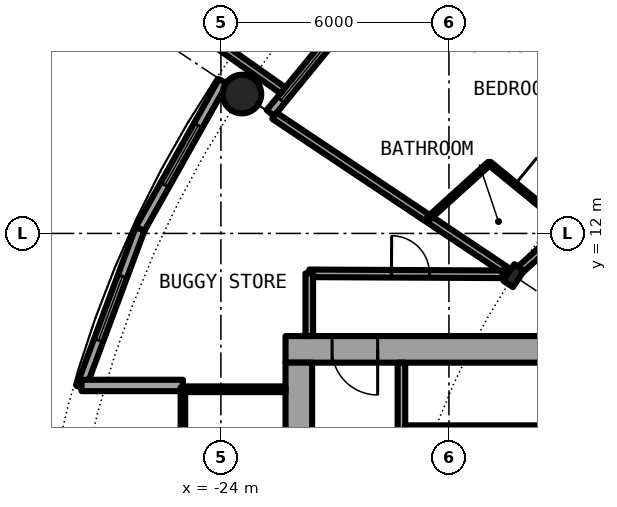
"""IFC4 building model, lengths in metres.
Left out: names, types, materials, properties, quantities, classifications, styles, units other than length and angle.
Written with IfcOpenShell. Run it as: python <this file> out.ifc"""

import sys

from ifc_helpers import new_model, si_unit, direction, frame, frame_2d, origin, origin_2d, place, context, subcontext, project, spatial, rectangle, hollow_circle, i_section, extrude, element, fill, save


model = new_model("IFC4")
c1 = context("Model", 3, precision=1e-05, world=origin(), true_north=direction((0.0, 1.0)))
c2 = subcontext(c1, "Body", "Model", "MODEL_VIEW")
j1 = project(units=[si_unit("LENGTHUNIT", "METRE"), si_unit("PLANEANGLEUNIT", "RADIAN")], contexts=[c1])
p1 = place(None, origin())
s1 = spatial("IfcSite", under=j1, at=p1, CompositionType="ELEMENT")
p2 = place(p1, origin())
s2 = spatial("IfcBuilding", under=s1, at=p2, CompositionType="ELEMENT")
p3 = place(p2, frame((0.0, 0.0, 81.9)))
s3 = spatial("IfcBuildingStorey", under=s2, at=p3, CompositionType="ELEMENT", Elevation=81.9)
p4 = place(p3, frame((-23.448, 15.667, 0.0), z_axis=(0.0, 0.0, 1.0), x_axis=(1.0, 0.0, 0.0)))
e1 = element("IfcColumn", 1, at=p4, inside=s3, PredefinedType="COLUMN", context=c2, shape_type="SweptSolid", body=[
    extrude(hollow_circle(Radius=0.508, WallThickness=0.04, at=origin_2d()), origin(), (0.0, 0.0, 1.0), 3.05),
])
p5 = place(p3, frame((-16.297, 10.889, 0.0), z_axis=(0.0, 0.0, 1.0), x_axis=(-0.831469612303, 0.55557023302, 0.0)))
e2 = element("IfcColumn", 2, at=p5, inside=s3, PredefinedType="COLUMN", context=c2, shape_type="SweptSolid", body=[
    extrude(i_section(OverallWidth=0.306, OverallDepth=0.524, WebThickness=0.021, FlangeThickness=0.04, FilletRadius=0.027, at=origin_2d()), origin(), (0.0, 0.0, 1.0), 3.05),
])
p6 = place(p3, frame((-19.304, 19.304, 0.0), z_axis=(0.0, 0.0, 1.0), x_axis=(-0.634382322723, -0.773019449054, 0.0)))
e3 = element("IfcWall", 3, at=p6, inside=s3, PredefinedType="SOLIDWALL", context=c2, shape_type="SweptSolid", body=[
    extrude(rectangle(XDim=5.352, YDim=0.25, at=frame_2d((2.676, 0.0))), origin(), (0.0, 0.0, 1.0), 2.7),
])
p7 = place(p6, frame((0.841, 0.0, 0.0)))
e4 = element("IfcOpeningElement", 4, at=p7, cuts=e3, PredefinedType="OPENING", context=c2, shape_type="SweptSolid", body=[
    extrude(rectangle(XDim=1.0, YDim=2.2, at=frame_2d((0.5, 1.1))), frame((0.0, 0.135, 0.0), z_axis=(0.0, -1.0, 0.0), x_axis=(1.0, 0.0, 0.0)), (0.0, 0.0, 1.0), 0.27),
])
p8 = place(p6, frame((3.111, 0.0, 0.3)))
e5 = element("IfcOpeningElement", 5, at=p8, cuts=e3, PredefinedType="OPENING", context=c2, shape_type="SweptSolid", body=[
    extrude(rectangle(XDim=1.8, YDim=2.1, at=frame_2d((0.9, 1.05))), frame((0.0, 0.135, 0.0), z_axis=(0.0, -1.0, 0.0), x_axis=(1.0, 0.0, 0.0)), (0.0, 0.0, 1.0), 0.27),
])
p9 = place(p3, frame((-22.37, 15.765, -0.03), z_axis=(0.0, 0.0, 1.0), x_axis=(-0.817256123454, 0.576274612209, 0.0)))
e6 = element("IfcWall", 6, at=p9, inside=s3, PredefinedType="SOLIDWALL", context=c2, shape_type="SweptSolid", body=[
    extrude(rectangle(XDim=2.933, YDim=0.2, at=frame_2d((1.466, 0.0))), origin(), (0.0, 0.0, 1.0), 2.73),
])
p10 = place(p3, frame((-23.946, 16.0, 0.0), z_axis=(0.0, 0.0, 1.0), x_axis=(-0.489696356642, -0.871893042919, 0.0)))
e7 = element("IfcWall", 7, at=p10, inside=s3, PredefinedType="SOLIDWALL", context=c2, shape_type="SweptSolid", body=[
    extrude(rectangle(XDim=4.454, YDim=0.25, at=frame_2d((2.227, 0.0))), origin(), (0.0, 0.0, 1.0), 2.7),
])
p11 = place(p10, frame((1.327, 0.0, 0.3)))
e8 = element("IfcOpeningElement", 8, at=p11, cuts=e7, PredefinedType="OPENING", context=c2, shape_type="SweptSolid", body=[
    extrude(rectangle(XDim=1.8, YDim=2.1, at=frame_2d((0.9, 1.05))), frame((0.0, 0.135, 0.0), z_axis=(0.0, -1.0, 0.0), x_axis=(1.0, 0.0, 0.0)), (0.0, 0.0, 1.0), 0.27),
])
p12 = place(p3, frame((-26.127, 12.117, 0.0), z_axis=(0.0, 0.0, 1.0), x_axis=(-0.349247811493, -0.937030397675, 0.0)))
e9 = element("IfcWall", 9, at=p12, inside=s3, PredefinedType="SOLIDWALL", context=c2, shape_type="SweptSolid", body=[
    extrude(rectangle(XDim=4.452, YDim=0.25, at=frame_2d((2.226, 0.0))), origin(), (0.0, 0.0, 1.0), 2.7),
])
p13 = place(p12, frame((1.327, 0.0, 0.3)))
e10 = element("IfcOpeningElement", 10, at=p13, cuts=e9, PredefinedType="OPENING", context=c2, shape_type="SweptSolid", body=[
    extrude(rectangle(XDim=1.8, YDim=2.1, at=frame_2d((0.9, 1.05))), frame((0.0, 0.135, 0.0), z_axis=(0.0, -1.0, 0.0), x_axis=(1.0, 0.0, 0.0)), (0.0, 0.0, 1.0), 0.27),
])
p14 = place(p3, frame((-25.0, 8.0, 0.0), z_axis=(0.0, 0.0, 1.0), x_axis=(-1.0, 0.0, 0.0)))
e11 = element("IfcWall", 11, at=p14, inside=s3, PredefinedType="SOLIDWALL", context=c2, shape_type="SweptSolid", body=[
    extrude(rectangle(XDim=2.667, YDim=0.3, at=frame_2d((1.333, 0.0))), origin(), (0.0, 0.0, 1.0), 2.7),
])
p15 = place(p3, frame((-8.3, 8.95, 0.0), z_axis=(0.0, 0.0, 1.0), x_axis=(-1.0, 0.0, 0.0)))
e12 = element("IfcWall", 12, at=p15, inside=s3, PredefinedType="SHEAR", context=c2, shape_type="SweptSolid", body=[
    extrude(rectangle(XDim=14.0, YDim=0.7, at=frame_2d((7.0, 0.0))), origin(), (0.0, 0.0, 1.0), 3.05),
])
p16 = place(p15, frame((11.575, 0.0, 0.0)))
e13 = element("IfcOpeningElement", 13, at=p16, cuts=e12, PredefinedType="OPENING", context=c2, shape_type="SweptSolid", body=[
    extrude(rectangle(XDim=1.2, YDim=2.3, at=frame_2d((0.6, 1.15))), frame((0.0, 0.36, 0.0), z_axis=(0.0, -1.0, 0.0), x_axis=(1.0, 0.0, 0.0)), (0.0, 0.0, 1.0), 0.72),
])
p17 = place(p3, frame((-21.95, -8.6, 0.0), z_axis=(0.0, 0.0, 1.0), x_axis=(0.0, 1.0, 0.0)))
e14 = element("IfcWall", 14, at=p17, inside=s3, PredefinedType="SHEAR", context=c2, shape_type="SweptSolid", body=[
    extrude(rectangle(XDim=17.2, YDim=0.7, at=frame_2d((8.6, 0.0))), origin(), (0.0, 0.0, 1.0), 3.05),
])
p18 = place(p17, frame((7.7, 0.0, 0.0)))
e15 = element("IfcOpeningElement", 15, at=p18, cuts=e14, PredefinedType="OPENING", context=c2, shape_type="SweptSolid", body=[
    extrude(rectangle(XDim=1.8, YDim=2.3, at=frame_2d((0.9, 1.15))), frame((0.0, 0.36, 0.0), z_axis=(0.0, -1.0, 0.0), x_axis=(1.0, 0.0, 0.0)), (0.0, 0.0, 1.0), 0.72),
])
p19 = place(p3, frame((-19.25, 8.6, 0.0), z_axis=(0.0, 0.0, 1.0), x_axis=(0.0, -1.0, 0.0)))
e16 = element("IfcWall", 16, at=p19, inside=s3, PredefinedType="SOLIDWALL", context=c2, shape_type="SweptSolid", body=[
    extrude(rectangle(XDim=7.025, YDim=0.2, at=frame_2d((3.513, 0.0))), origin(), (0.0, 0.0, 1.0), 2.7),
])
p20 = place(p19, frame((2.35, 0.0, 0.0)))
e17 = element("IfcOpeningElement", 17, at=p20, cuts=e16, PredefinedType="OPENING", context=c2, shape_type="SweptSolid", body=[
    extrude(rectangle(XDim=1.1, YDim=2.3, at=frame_2d((0.55, 1.15))), frame((0.0, 0.11, 0.0), z_axis=(0.0, -1.0, 0.0), x_axis=(1.0, 0.0, 0.0)), (0.0, 0.0, 1.0), 0.22),
])
p21 = place(p3, frame((-15.45, 6.875, 0.0), z_axis=(0.0, 0.0, 1.0), x_axis=(-1.0, 0.0, 0.0)))
e18 = element("IfcWall", 18, at=p21, inside=s3, PredefinedType="PARTITIONING", context=c2, shape_type="SweptSolid", body=[
    extrude(rectangle(XDim=3.7, YDim=0.15, at=frame_2d((1.85, 0.0))), origin(), (0.0, 0.0, 1.0), 2.7),
])
p22 = place(p21, frame((1.4, 0.0, 0.0)))
e19 = element("IfcOpeningElement", 19, at=p22, cuts=e18, PredefinedType="OPENING", context=c2, shape_type="SweptSolid", body=[
    extrude(rectangle(XDim=0.9, YDim=2.3, at=frame_2d((0.45, 1.15))), frame((0.0, 0.085, 0.0), z_axis=(0.0, -1.0, 0.0), x_axis=(1.0, 0.0, 0.0)), (0.0, 0.0, 1.0), 0.17),
])
p23 = place(p3, frame((-22.3, 7.9, 0.0), z_axis=(0.0, 0.0, 1.0), x_axis=(-1.0, 0.0, 0.0)))
e20 = element("IfcWall", 20, at=p23, inside=s3, PredefinedType="PARTITIONING", context=c2, shape_type="SweptSolid", body=[
    extrude(rectangle(XDim=2.64, YDim=0.15, at=frame_2d((1.32, 0.0))), origin(), (0.0, 0.0, 1.0), 2.7),
])
p24 = place(p3, frame((-25.0, 7.95, 0.0), z_axis=(0.0, 0.0, 1.0), x_axis=(0.0, -1.0, 0.0)))
e21 = element("IfcWall", 21, at=p24, inside=s3, PredefinedType="PARTITIONING", context=c2, shape_type="SweptSolid", body=[
    extrude(rectangle(XDim=15.9, YDim=0.12, at=frame_2d((7.95, 0.0))), origin(), (0.0, 0.0, 1.0), 2.7),
])
p25 = place(p24, frame((0.95, 0.0, 0.1)))
e22 = element("IfcOpeningElement", 22, at=p25, cuts=e21, PredefinedType="OPENING", context=c2, shape_type="SweptSolid", body=[
    extrude(rectangle(XDim=14.0, YDim=2.35, at=frame_2d((7.0, 1.175))), frame((0.0, 0.07, 0.0), z_axis=(0.0, -1.0, 0.0), x_axis=(1.0, 0.0, 0.0)), (0.0, 0.0, 1.0), 0.14),
])
p26 = place(p3, frame((-22.595, 15.098, 0.0), z_axis=(0.0, 0.0, 1.0), x_axis=(0.831382022135, -0.555701298605, 0.0)))
e23 = element("IfcWall", 23, at=p26, inside=s3, PredefinedType="PARTITIONING", context=c2, shape_type="SweptSolid", body=[
    extrude(rectangle(XDim=7.313, YDim=0.2, at=frame_2d((3.657, 0.0))), origin(), (0.0, 0.0, 1.0), 2.7),
])
p27 = place(p3, frame((-17.221, 21.022, 0.0), z_axis=(0.0, 0.0, 1.0), x_axis=(0.633735868108, -0.773549513266, 0.0)))
e24 = element("IfcWall", 24, at=p27, inside=s3, PredefinedType="PARTITIONING", context=c2, shape_type="SweptSolid", body=[
    extrude(rectangle(XDim=8.139, YDim=0.1, at=frame_2d((4.069, 0.0))), origin(), (0.0, 0.0, 1.0), 2.7),
])
p28 = place(p27, frame((6.378, 0.0, 0.0)))
e25 = element("IfcOpeningElement", 25, at=p28, cuts=e24, PredefinedType="OPENING", context=c2, shape_type="SweptSolid", body=[
    extrude(rectangle(XDim=0.9, YDim=2.3, at=frame_2d((0.45, 1.15))), frame((0.0, 0.06, 0.0), z_axis=(0.0, -1.0, 0.0), x_axis=(1.0, 0.0, 0.0)), (0.0, 0.0, 1.0), 0.12),
])
p29 = place(p27, frame((2.308, 0.0, 0.0)))
e26 = element("IfcOpeningElement", 26, at=p29, cuts=e24, PredefinedType="OPENING", context=c2, shape_type="SweptSolid", body=[
    extrude(rectangle(XDim=0.9, YDim=2.3, at=frame_2d((0.45, 1.15))), frame((0.0, 0.06, 0.0), z_axis=(0.0, -1.0, 0.0), x_axis=(1.0, 0.0, 0.0)), (0.0, 0.0, 1.0), 0.12),
])
p30 = place(p3, frame((-16.936, 13.845, 0.0), z_axis=(0.0, 0.0, 1.0), x_axis=(0.774162545943, -0.632986850147, 0.0)))
e27 = element("IfcWall", 27, at=p30, inside=s3, PredefinedType="PARTITIONING", context=c2, shape_type="SweptSolid", body=[
    extrude(rectangle(XDim=2.649, YDim=0.1, at=frame_2d((1.325, 0.0))), origin(), (0.0, 0.0, 1.0), 2.7),
])
p31 = place(p30, frame((0.875, 0.0, 0.0)))
e28 = element("IfcOpeningElement", 28, at=p31, cuts=e27, PredefinedType="OPENING", context=c2, shape_type="SweptSolid", body=[
    extrude(rectangle(XDim=0.9, YDim=2.3, at=frame_2d((0.45, 1.15))), frame((0.0, 0.06, 0.0), z_axis=(0.0, -1.0, 0.0), x_axis=(1.0, 0.0, 0.0)), (0.0, 0.0, 1.0), 0.12),
])
p32 = place(p3, frame((-21.675, 10.95, 0.0), z_axis=(0.0, 0.0, 1.0), x_axis=(0.999988019025, -0.004895079807, 0.0)))
e29 = element("IfcWall", 29, at=p32, inside=s3, PredefinedType="PARTITIONING", context=c2, shape_type="SweptSolid", body=[
    extrude(rectangle(XDim=5.087, YDim=0.2, at=frame_2d((2.543, 0.0))), origin(), (0.0, 0.0, 1.0), 2.7),
])
p33 = place(p32, frame((2.163, 0.0, 0.0)))
e30 = element("IfcOpeningElement", 30, at=p33, cuts=e29, PredefinedType="OPENING", context=c2, shape_type="SweptSolid", body=[
    extrude(rectangle(XDim=1.0, YDim=2.3, at=frame_2d((0.5, 1.15))), frame((0.0, 0.11, 0.0), z_axis=(0.0, -1.0, 0.0), x_axis=(1.0, 0.0, 0.0)), (0.0, 0.0, 1.0), 0.22),
])
p34 = place(p3, frame((-16.18, 10.995, 0.0), z_axis=(0.0, 0.0, 1.0), x_axis=(0.741086986457, 0.671409024741, 0.0)))
e31 = element("IfcWall", 31, at=p34, inside=s3, PredefinedType="PARTITIONING", context=c2, shape_type="SweptSolid", body=[
    extrude(rectangle(XDim=9.373, YDim=0.2, at=frame_2d((4.687, 0.0))), origin(), (0.0, 0.0, 1.0), 2.38),
])
p35 = place(p34, frame((3.152, 0.0, 0.0)))
e32 = element("IfcOpeningElement", 32, at=p35, cuts=e31, PredefinedType="OPENING", context=c2, shape_type="SweptSolid", body=[
    extrude(rectangle(XDim=1.0, YDim=2.3, at=frame_2d((0.5, 1.15))), frame((0.0, 0.11, 0.0), z_axis=(0.0, -1.0, 0.0), x_axis=(1.0, 0.0, 0.0)), (0.0, 0.0, 1.0), 0.22),
])
p36 = place(p3, frame((-18.54, 12.392, 0.0), z_axis=(0.0, 0.0, 1.0), x_axis=(0.741319612235, 0.671152167929, 0.0)))
e33 = element("IfcWall", 33, at=p36, inside=s3, PredefinedType="PARTITIONING", context=c2, shape_type="SweptSolid", body=[
    extrude(rectangle(XDim=2.168, YDim=0.1, at=frame_2d((1.084, 0.0))), origin(), (0.0, 0.0, 1.0), 2.7),
])
p37 = place(p3, frame((-21.675, 9.3, 0.0), z_axis=(0.0, 0.0, 1.0), x_axis=(0.0, 1.0, 0.0)))
e34 = element("IfcWall", 34, at=p37, inside=s3, PredefinedType="PARTITIONING", context=c2, shape_type="SweptSolid", body=[
    extrude(rectangle(XDim=1.65, YDim=0.2, at=frame_2d((0.825, 0.0))), origin(), (0.0, 0.0, 1.0), 2.7),
])
p38 = place(p8, origin())
e35 = element("IfcWindow", 35, at=p38, inside=s3, PartitioningType="SINGLE_PANEL", PredefinedType="WINDOW", context=c2, shape_type="SweptSolid", body=[
    extrude(rectangle(XDim=1.8, YDim=2.1, at=frame_2d((0.9, 1.05))), frame((0.0, 0.03, 0.0), z_axis=(0.0, -1.0, 0.0), x_axis=(1.0, 0.0, 0.0)), (0.0, 0.0, 1.0), 0.06),
])
fill(e5, e35)
p39 = place(p11, origin())
e36 = element("IfcWindow", 36, at=p39, inside=s3, PartitioningType="SINGLE_PANEL", PredefinedType="WINDOW", context=c2, shape_type="SweptSolid", body=[
    extrude(rectangle(XDim=1.8, YDim=2.1, at=frame_2d((0.9, 1.05))), frame((0.0, 0.03, 0.0), z_axis=(0.0, -1.0, 0.0), x_axis=(1.0, 0.0, 0.0)), (0.0, 0.0, 1.0), 0.06),
])
fill(e8, e36)
p40 = place(p13, origin())
e37 = element("IfcWindow", 37, at=p40, inside=s3, PartitioningType="SINGLE_PANEL", PredefinedType="WINDOW", context=c2, shape_type="SweptSolid", body=[
    extrude(rectangle(XDim=1.8, YDim=2.1, at=frame_2d((0.9, 1.05))), frame((0.0, 0.03, 0.0), z_axis=(0.0, -1.0, 0.0), x_axis=(1.0, 0.0, 0.0)), (0.0, 0.0, 1.0), 0.06),
])
fill(e10, e37)
p41 = place(p22, origin())
e38 = element("IfcDoor", 38, at=p41, inside=s3, OperationType="SINGLE_SWING_LEFT", PredefinedType="DOOR", context=c2, shape_type="SweptSolid", body=[
    extrude(rectangle(XDim=0.9, YDim=2.3, at=frame_2d((0.45, 1.15))), frame((0.0, 0.025, 0.0), z_axis=(0.0, -1.0, 0.0), x_axis=(1.0, 0.0, 0.0)), (0.0, 0.0, 1.0), 0.05),
])
fill(e19, e38)
p42 = place(p16, origin())
e39 = element("IfcDoor", 39, at=p42, inside=s3, OperationType="SINGLE_SWING_LEFT", PredefinedType="DOOR", context=c2, shape_type="SweptSolid", body=[
    extrude(rectangle(XDim=1.2, YDim=2.3, at=frame_2d((0.6, 1.15))), frame((0.0, 0.025, 0.0), z_axis=(0.0, -1.0, 0.0), x_axis=(1.0, 0.0, 0.0)), (0.0, 0.0, 1.0), 0.05),
])
fill(e13, e39)
p43 = place(p25, origin())
e40 = element("IfcWindow", 40, at=p43, inside=s3, PartitioningType="SINGLE_PANEL", PredefinedType="WINDOW", context=c2, shape_type="SweptSolid", body=[
    extrude(rectangle(XDim=14.0, YDim=2.35, at=frame_2d((7.0, 1.175))), frame((0.0, 0.03, 0.0), z_axis=(0.0, -1.0, 0.0), x_axis=(1.0, 0.0, 0.0)), (0.0, 0.0, 1.0), 0.06),
])
fill(e22, e40)
p44 = place(p31, origin())
e41 = element("IfcDoor", 41, at=p44, inside=s3, OperationType="SINGLE_SWING_LEFT", PredefinedType="DOOR", context=c2, shape_type="SweptSolid", body=[
    extrude(rectangle(XDim=0.9, YDim=2.3, at=frame_2d((0.45, 1.15))), frame((0.0, 0.025, 0.0), z_axis=(0.0, -1.0, 0.0), x_axis=(1.0, 0.0, 0.0)), (0.0, 0.0, 1.0), 0.05),
])
fill(e28, e41)
p45 = place(p33, origin())
e42 = element("IfcDoor", 42, at=p45, inside=s3, OperationType="SINGLE_SWING_RIGHT", PredefinedType="DOOR", context=c2, shape_type="SweptSolid", body=[
    extrude(rectangle(XDim=1.0, YDim=2.3, at=frame_2d((0.5, 1.15))), frame((0.0, 0.025, 0.0), z_axis=(0.0, -1.0, 0.0), x_axis=(1.0, 0.0, 0.0)), (0.0, 0.0, 1.0), 0.05),
])
fill(e30, e42)
save(model, sys.argv[1])
